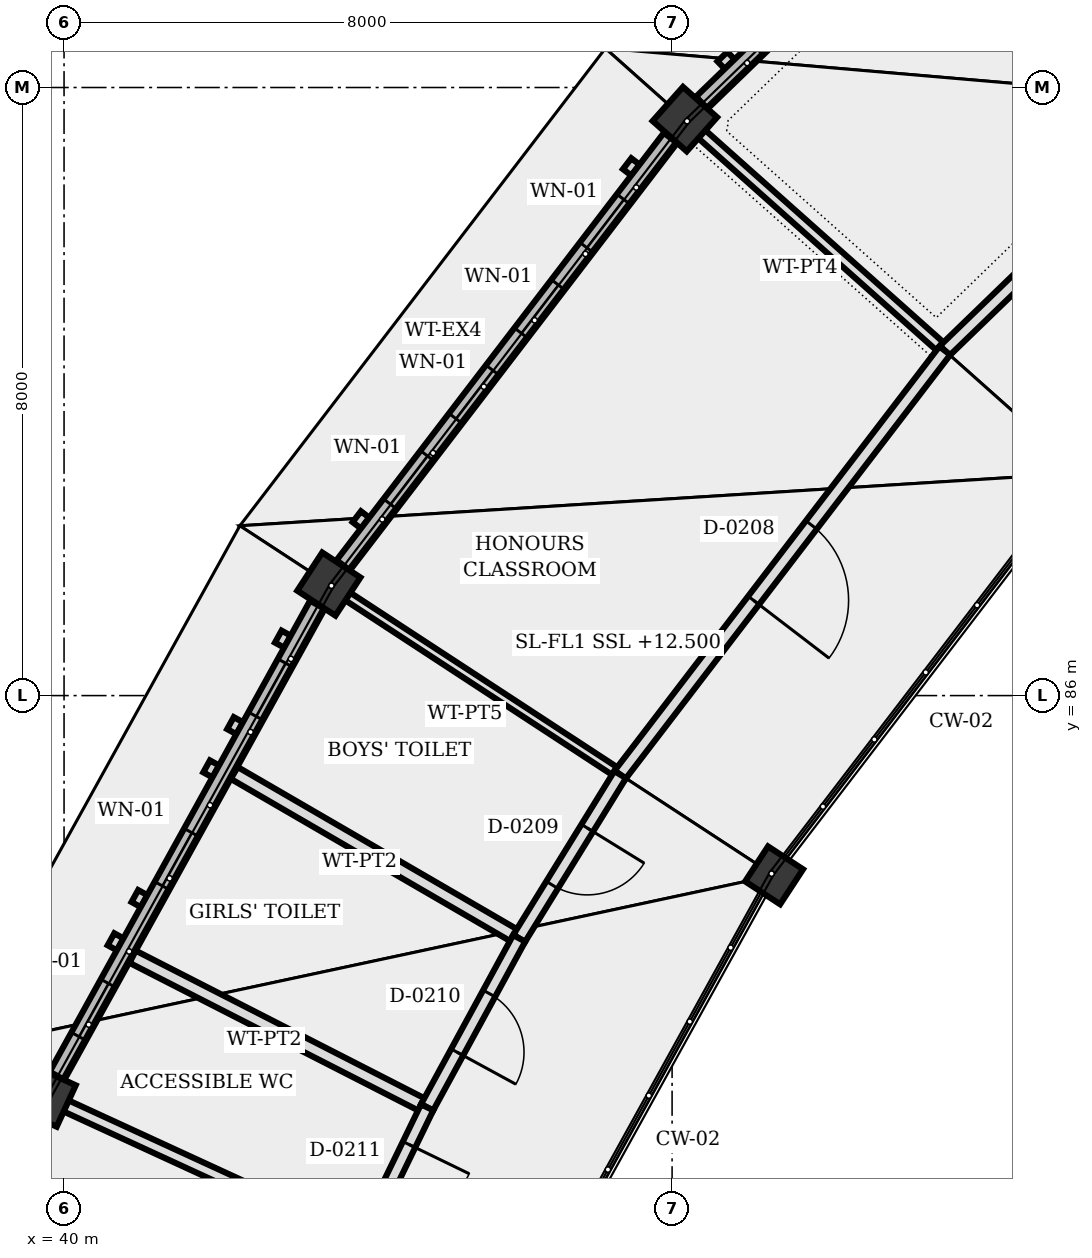
"""IFC4 building model, lengths in metres.
Left out: names, types, materials, properties, quantities, classifications, styles, units other than length and angle.
Written with IfcOpenShell. Run it as: python <this file> out.ifc"""

import sys

from ifc_helpers import new_model, si_unit, direction, frame, frame_2d, origin, origin_2d, place, context, subcontext, project, spatial, rectangle, extrude, element, fill, save


model = new_model("IFC4")
c1 = context("Model", 3, precision=1e-05, world=origin(), true_north=direction((0.0, 1.0)))
c2 = subcontext(c1, "Body", "Model", "MODEL_VIEW")
j1 = project(units=[si_unit("LENGTHUNIT", "METRE"), si_unit("PLANEANGLEUNIT", "RADIAN")], contexts=[c1])
p1 = place(None, origin())
s1 = spatial("IfcSite", under=j1, at=p1, CompositionType="ELEMENT")
p2 = place(p1, origin())
s2 = spatial("IfcBuilding", under=s1, at=p2, CompositionType="ELEMENT")
p3 = place(p2, frame((0.0, 0.0, 12.5)))
s3 = spatial("IfcBuildingStorey", under=s2, at=p3, CompositionType="ELEMENT", Elevation=12.5)
p4 = place(p3, frame((49.342, 83.635, 0.0), z_axis=(0.0, 0.0, 1.0), x_axis=(-0.836840759551, 0.547446383817, 0.0)))
e1 = element("IfcColumn", 1, at=p4, inside=s3, PredefinedType="COLUMN", context=c2, shape_type="SweptSolid", body=[
    extrude(rectangle(XDim=0.55, YDim=0.55, at=origin_2d()), origin(), (0.0, 0.0, 1.0), 2.64),
])
for number, where, z_axis, x_axis in (
    (2, (48.168, 93.584, 0.0), (0.0, 0.0, 1.0), (-0.747, 0.665, 0.0)),
    (3, (43.484, 87.467, 0.0), (0.0, 0.0, 1.0), (-0.837, 0.547, 0.0)),
    (4, (39.756, 80.726, 0.0), (0.0, 0.0, 1.0), (-0.909, 0.418, 0.0)),
):
    element("IfcColumn", number, at=place(p3, frame(where, z_axis=z_axis, x_axis=x_axis)), inside=s3, PredefinedType="COLUMN", context=c2, shape_type="SweptSolid", body=[
        extrude(rectangle(XDim=0.6, YDim=0.6, at=origin_2d()), origin(), (0.0, 0.0, 1.0), 4.16),
    ])
p5 = place(p3, frame((48.391, 93.8, 0.0), z_axis=(0.0, 0.0, 1.0), x_axis=(0.71857824473, 0.695446120272, 0.0)))
e5 = element("IfcWall", 5, at=p5, inside=s3, PredefinedType="SOLIDWALL", context=c2, shape_type="SweptSolid", body=[
    extrude(rectangle(XDim=7.082, YDim=0.22, at=frame_2d((3.541, 0.0))), origin(), (0.0, 0.0, 1.0), 3.537),
])
p6 = place(p5, frame((1.016, 0.0, 0.85)))
e6 = element("IfcOpeningElement", 6, at=p6, cuts=e5, PredefinedType="OPENING", context=c2, shape_type="SweptSolid", body=[
    extrude(rectangle(XDim=0.8, YDim=1.1, at=frame_2d((0.4, 0.55))), frame((0.0, 0.12, 0.0), z_axis=(0.0, -1.0, 0.0), x_axis=(1.0, 0.0, 0.0)), (0.0, 0.0, 1.0), 0.24),
])
p7 = place(p5, frame((2.433, 0.0, 0.85)))
e7 = element("IfcOpeningElement", 7, at=p7, cuts=e5, PredefinedType="OPENING", context=c2, shape_type="SweptSolid", body=[
    extrude(rectangle(XDim=0.8, YDim=1.1, at=frame_2d((0.4, 0.55))), frame((0.0, 0.12, 0.0), z_axis=(0.0, -1.0, 0.0), x_axis=(1.0, 0.0, 0.0)), (0.0, 0.0, 1.0), 0.24),
])
p8 = place(p5, frame((3.849, 0.0, 0.85)))
e8 = element("IfcOpeningElement", 8, at=p8, cuts=e5, PredefinedType="OPENING", context=c2, shape_type="SweptSolid", body=[
    extrude(rectangle(XDim=0.8, YDim=1.1, at=frame_2d((0.4, 0.55))), frame((0.0, 0.12, 0.0), z_axis=(0.0, -1.0, 0.0), x_axis=(1.0, 0.0, 0.0)), (0.0, 0.0, 1.0), 0.24),
])
p9 = place(p5, frame((5.266, 0.0, 0.85)))
e9 = element("IfcOpeningElement", 9, at=p9, cuts=e5, PredefinedType="OPENING", context=c2, shape_type="SweptSolid", body=[
    extrude(rectangle(XDim=0.8, YDim=1.1, at=frame_2d((0.4, 0.55))), frame((0.0, 0.12, 0.0), z_axis=(0.0, -1.0, 0.0), x_axis=(1.0, 0.0, 0.0)), (0.0, 0.0, 1.0), 0.24),
])
p10 = place(p3, frame((43.673, 87.714, 0.0), z_axis=(0.0, 0.0, 1.0), x_axis=(0.607995054755, 0.793940812273, 0.0)))
e10 = element("IfcWall", 10, at=p10, inside=s3, PredefinedType="SOLIDWALL", context=c2, shape_type="SweptSolid", body=[
    extrude(rectangle(XDim=7.082, YDim=0.22, at=frame_2d((3.541, 0.0))), origin(), (0.0, 0.0, 1.0), 3.537),
])
p11 = place(p10, frame((1.016, 0.0, 0.85)))
e11 = element("IfcOpeningElement", 11, at=p11, cuts=e10, PredefinedType="OPENING", context=c2, shape_type="SweptSolid", body=[
    extrude(rectangle(XDim=0.8, YDim=1.1, at=frame_2d((0.4, 0.55))), frame((0.0, 0.12, 0.0), z_axis=(0.0, -1.0, 0.0), x_axis=(1.0, 0.0, 0.0)), (0.0, 0.0, 1.0), 0.24),
])
p12 = place(p10, frame((2.433, 0.0, 0.85)))
e12 = element("IfcOpeningElement", 12, at=p12, cuts=e10, PredefinedType="OPENING", context=c2, shape_type="SweptSolid", body=[
    extrude(rectangle(XDim=0.8, YDim=1.1, at=frame_2d((0.4, 0.55))), frame((0.0, 0.12, 0.0), z_axis=(0.0, -1.0, 0.0), x_axis=(1.0, 0.0, 0.0)), (0.0, 0.0, 1.0), 0.24),
])
p13 = place(p10, frame((3.849, 0.0, 0.85)))
e13 = element("IfcOpeningElement", 13, at=p13, cuts=e10, PredefinedType="OPENING", context=c2, shape_type="SweptSolid", body=[
    extrude(rectangle(XDim=0.8, YDim=1.1, at=frame_2d((0.4, 0.55))), frame((0.0, 0.12, 0.0), z_axis=(0.0, -1.0, 0.0), x_axis=(1.0, 0.0, 0.0)), (0.0, 0.0, 1.0), 0.24),
])
p14 = place(p10, frame((5.266, 0.0, 0.85)))
e14 = element("IfcOpeningElement", 14, at=p14, cuts=e10, PredefinedType="OPENING", context=c2, shape_type="SweptSolid", body=[
    extrude(rectangle(XDim=0.8, YDim=1.1, at=frame_2d((0.4, 0.55))), frame((0.0, 0.12, 0.0), z_axis=(0.0, -1.0, 0.0), x_axis=(1.0, 0.0, 0.0)), (0.0, 0.0, 1.0), 0.24),
])
p15 = place(p3, frame((39.907, 80.998, 0.0), z_axis=(0.0, 0.0, 1.0), x_axis=(0.483832760768, 0.875160476489, 0.0)))
e15 = element("IfcWall", 15, at=p15, inside=s3, PredefinedType="SOLIDWALL", context=c2, shape_type="SweptSolid", body=[
    extrude(rectangle(XDim=7.081, YDim=0.22, at=frame_2d((3.541, 0.0))), origin(), (0.0, 0.0, 1.0), 3.537),
])
p16 = place(p15, frame((0.591, 0.0, 1.15)))
e16 = element("IfcOpeningElement", 16, at=p16, cuts=e15, PredefinedType="OPENING", context=c2, shape_type="SweptSolid", body=[
    extrude(rectangle(XDim=0.8, YDim=1.1, at=frame_2d((0.4, 0.55))), frame((0.0, 0.12, 0.0), z_axis=(0.0, -1.0, 0.0), x_axis=(1.0, 0.0, 0.0)), (0.0, 0.0, 1.0), 0.24),
])
p17 = place(p15, frame((2.857, 0.0, 1.15)))
e17 = element("IfcOpeningElement", 17, at=p17, cuts=e15, PredefinedType="OPENING", context=c2, shape_type="SweptSolid", body=[
    extrude(rectangle(XDim=0.8, YDim=1.1, at=frame_2d((0.4, 0.55))), frame((0.0, 0.12, 0.0), z_axis=(0.0, -1.0, 0.0), x_axis=(1.0, 0.0, 0.0)), (0.0, 0.0, 1.0), 0.24),
])
p18 = place(p15, frame((5.406, 0.0, 1.15)))
e18 = element("IfcOpeningElement", 18, at=p18, cuts=e15, PredefinedType="OPENING", context=c2, shape_type="SweptSolid", body=[
    extrude(rectangle(XDim=0.8, YDim=1.1, at=frame_2d((0.4, 0.55))), frame((0.0, 0.12, 0.0), z_axis=(0.0, -1.0, 0.0), x_axis=(1.0, 0.0, 0.0)), (0.0, 0.0, 1.0), 0.24),
])
p19 = place(p3, frame((51.588, 90.538, 0.0), z_axis=(0.0, 0.0, 1.0), x_axis=(-0.746752390412, 0.665102148105, 0.0)))
e19 = element("IfcWall", 19, at=p19, inside=s3, PredefinedType="PARTITIONING", context=c2, shape_type="SweptSolid", body=[
    extrude(rectangle(XDim=4.288, YDim=0.14, at=frame_2d((2.144, 0.0))), origin(), (0.0, 0.0, 1.0), 3.397),
])
p20 = place(p3, frame((47.317, 84.96, 0.0), z_axis=(0.0, 0.0, 1.0), x_axis=(-0.836931498536, 0.54730765275, 0.0)))
e20 = element("IfcWall", 20, at=p20, inside=s3, PredefinedType="PARTITIONING", context=c2, shape_type="SweptSolid", body=[
    extrude(rectangle(XDim=4.288, YDim=0.12, at=frame_2d((2.144, 0.0))), origin(), (0.0, 0.0, 1.0), 3.397),
])
p21 = place(p3, frame((43.917, 78.812, 0.0), z_axis=(0.0, 0.0, 1.0), x_axis=(-0.908505150055, 0.417873655934, 0.0)))
e21 = element("IfcWall", 21, at=p21, inside=s3, PredefinedType="PARTITIONING", context=c2, shape_type="SweptSolid", body=[
    extrude(rectangle(XDim=4.288, YDim=0.16, at=frame_2d((2.144, 0.0))), origin(), (0.0, 0.0, 1.0), 3.397),
])
p22 = place(p3, frame((45.988, 82.806, 0.0), z_axis=(0.0, 0.0, 1.0), x_axis=(-0.864871773355, 0.501992844225, 0.0)))
e22 = element("IfcWall", 22, at=p22, inside=s3, PredefinedType="PARTITIONING", context=c2, shape_type="SweptSolid", body=[
    extrude(rectangle(XDim=4.335, YDim=0.18, at=frame_2d((2.167, 0.0))), origin(), (0.0, 0.0, 1.0), 3.398),
])
p23 = place(p3, frame((44.777, 80.583, 0.0), z_axis=(0.0, 0.0, 1.0), x_axis=(-0.890397294755, 0.455184201717, 0.0)))
e23 = element("IfcWall", 23, at=p23, inside=s3, PredefinedType="PARTITIONING", context=c2, shape_type="SweptSolid", body=[
    extrude(rectangle(XDim=4.352, YDim=0.18, at=frame_2d((2.176, 0.0))), origin(), (0.0, 0.0, 1.0), 3.397),
])
p24 = place(p3, frame((56.636, 95.424, 0.0), z_axis=(0.0, 0.0, 1.0), x_axis=(-0.718550040998, -0.695475260942, 0.0)))
e24 = element("IfcWall", 24, at=p24, inside=s3, PredefinedType="PARTITIONING", context=c2, shape_type="SweptSolid", body=[
    extrude(rectangle(XDim=7.025, YDim=0.18, at=frame_2d((3.513, 0.0))), origin(), (0.0, 0.0, 1.0), 3.397),
])
p25 = place(p24, frame((3.023, 0.0, 0.0)))
e25 = element("IfcOpeningElement", 25, at=p25, cuts=e24, PredefinedType="OPENING", context=c2, shape_type="SweptSolid", body=[
    extrude(rectangle(XDim=0.98, YDim=2.2, at=frame_2d((0.49, 1.1))), frame((0.0, 0.1, 0.0), z_axis=(0.0, -1.0, 0.0), x_axis=(1.0, 0.0, 0.0)), (0.0, 0.0, 1.0), 0.2),
])
p26 = place(p3, frame((51.588, 90.538, 0.0), z_axis=(0.0, 0.0, 1.0), x_axis=(-0.607932411016, -0.793988780548, 0.0)))
e26 = element("IfcWall", 26, at=p26, inside=s3, PredefinedType="PARTITIONING", context=c2, shape_type="SweptSolid", body=[
    extrude(rectangle(XDim=7.025, YDim=0.18, at=frame_2d((3.513, 0.0))), origin(), (0.0, 0.0, 1.0), 3.397),
])
p27 = place(p26, frame((2.888, 0.0, 0.0)))
e27 = element("IfcOpeningElement", 27, at=p27, cuts=e26, PredefinedType="OPENING", context=c2, shape_type="SweptSolid", body=[
    extrude(rectangle(XDim=1.25, YDim=2.2, at=frame_2d((0.625, 1.1))), frame((0.0, 0.1, 0.0), z_axis=(0.0, -1.0, 0.0), x_axis=(1.0, 0.0, 0.0)), (0.0, 0.0, 1.0), 0.2),
])
p28 = place(p3, frame((47.317, 84.96, 0.0), z_axis=(0.0, 0.0, 1.0), x_axis=(-0.52503894851, -0.851078200019, 0.0)))
e28 = element("IfcWall", 28, at=p28, inside=s3, PredefinedType="PARTITIONING", context=c2, shape_type="SweptSolid", body=[
    extrude(rectangle(XDim=2.531, YDim=0.18, at=frame_2d((1.266, 0.0))), origin(), (0.0, 0.0, 1.0), 3.397),
])
p29 = place(p28, frame((0.825, 0.0, 0.0)))
e29 = element("IfcOpeningElement", 29, at=p29, cuts=e28, PredefinedType="OPENING", context=c2, shape_type="SweptSolid", body=[
    extrude(rectangle(XDim=0.88, YDim=2.1, at=frame_2d((0.44, 1.05))), frame((0.0, 0.1, 0.0), z_axis=(0.0, -1.0, 0.0), x_axis=(1.0, 0.0, 0.0)), (0.0, 0.0, 1.0), 0.2),
])
p30 = place(p3, frame((45.988, 82.806, 0.0), z_axis=(0.0, 0.0, 1.0), x_axis=(-0.478379038954, -0.878153457597, 0.0)))
e30 = element("IfcWall", 30, at=p30, inside=s3, PredefinedType="PARTITIONING", context=c2, shape_type="SweptSolid", body=[
    extrude(rectangle(XDim=2.531, YDim=0.18, at=frame_2d((1.266, 0.0))), origin(), (0.0, 0.0, 1.0), 3.397),
])
p31 = place(p30, frame((0.826, 0.0, 0.0)))
e31 = element("IfcOpeningElement", 31, at=p31, cuts=e30, PredefinedType="OPENING", context=c2, shape_type="SweptSolid", body=[
    extrude(rectangle(XDim=0.88, YDim=2.1, at=frame_2d((0.44, 1.05))), frame((0.0, 0.1, 0.0), z_axis=(0.0, -1.0, 0.0), x_axis=(1.0, 0.0, 0.0)), (0.0, 0.0, 1.0), 0.2),
])
p32 = place(p3, frame((44.777, 80.583, 0.0), z_axis=(0.0, 0.0, 1.0), x_axis=(-0.436866695587, -0.899526258809, 0.0)))
e32 = element("IfcWall", 32, at=p32, inside=s3, PredefinedType="PARTITIONING", context=c2, shape_type="SweptSolid", body=[
    extrude(rectangle(XDim=1.969, YDim=0.18, at=frame_2d((0.984, 0.0))), origin(), (0.0, 0.0, 1.0), 3.397),
])
p33 = place(p32, frame((0.544, 0.0, 0.0)))
e33 = element("IfcOpeningElement", 33, at=p33, cuts=e32, PredefinedType="OPENING", context=c2, shape_type="SweptSolid", body=[
    extrude(rectangle(XDim=0.88, YDim=2.1, at=frame_2d((0.44, 1.05))), frame((0.0, 0.1, 0.0), z_axis=(0.0, -1.0, 0.0), x_axis=(1.0, 0.0, 0.0)), (0.0, 0.0, 1.0), 0.2),
])
p34 = place(p11, origin())
e34 = element("IfcWindow", 34, at=p34, inside=s3, PartitioningType="SINGLE_PANEL", PredefinedType="WINDOW", context=c2, shape_type="SweptSolid", body=[
    extrude(rectangle(XDim=0.8, YDim=1.1, at=frame_2d((0.4, 0.55))), frame((0.0, 0.03, 0.0), z_axis=(0.0, -1.0, 0.0), x_axis=(1.0, 0.0, 0.0)), (0.0, 0.0, 1.0), 0.06),
])
fill(e11, e34)
p35 = place(p12, origin())
e35 = element("IfcWindow", 35, at=p35, inside=s3, PartitioningType="SINGLE_PANEL", PredefinedType="WINDOW", context=c2, shape_type="SweptSolid", body=[
    extrude(rectangle(XDim=0.8, YDim=1.1, at=frame_2d((0.4, 0.55))), frame((0.0, 0.03, 0.0), z_axis=(0.0, -1.0, 0.0), x_axis=(1.0, 0.0, 0.0)), (0.0, 0.0, 1.0), 0.06),
])
fill(e12, e35)
p36 = place(p13, origin())
e36 = element("IfcWindow", 36, at=p36, inside=s3, PartitioningType="SINGLE_PANEL", PredefinedType="WINDOW", context=c2, shape_type="SweptSolid", body=[
    extrude(rectangle(XDim=0.8, YDim=1.1, at=frame_2d((0.4, 0.55))), frame((0.0, 0.03, 0.0), z_axis=(0.0, -1.0, 0.0), x_axis=(1.0, 0.0, 0.0)), (0.0, 0.0, 1.0), 0.06),
])
fill(e13, e36)
p37 = place(p14, origin())
e37 = element("IfcWindow", 37, at=p37, inside=s3, PartitioningType="SINGLE_PANEL", PredefinedType="WINDOW", context=c2, shape_type="SweptSolid", body=[
    extrude(rectangle(XDim=0.8, YDim=1.1, at=frame_2d((0.4, 0.55))), frame((0.0, 0.03, 0.0), z_axis=(0.0, -1.0, 0.0), x_axis=(1.0, 0.0, 0.0)), (0.0, 0.0, 1.0), 0.06),
])
fill(e14, e37)
p38 = place(p16, origin())
e38 = element("IfcWindow", 38, at=p38, inside=s3, PartitioningType="SINGLE_PANEL", PredefinedType="WINDOW", context=c2, shape_type="SweptSolid", body=[
    extrude(rectangle(XDim=0.8, YDim=1.1, at=frame_2d((0.4, 0.55))), frame((0.0, 0.03, 0.0), z_axis=(0.0, -1.0, 0.0), x_axis=(1.0, 0.0, 0.0)), (0.0, 0.0, 1.0), 0.06),
])
fill(e16, e38)
p39 = place(p17, origin())
e39 = element("IfcWindow", 39, at=p39, inside=s3, PartitioningType="SINGLE_PANEL", PredefinedType="WINDOW", context=c2, shape_type="SweptSolid", body=[
    extrude(rectangle(XDim=0.8, YDim=1.1, at=frame_2d((0.4, 0.55))), frame((0.0, 0.03, 0.0), z_axis=(0.0, -1.0, 0.0), x_axis=(1.0, 0.0, 0.0)), (0.0, 0.0, 1.0), 0.06),
])
fill(e17, e39)
p40 = place(p18, origin())
e40 = element("IfcWindow", 40, at=p40, inside=s3, PartitioningType="SINGLE_PANEL", PredefinedType="WINDOW", context=c2, shape_type="SweptSolid", body=[
    extrude(rectangle(XDim=0.8, YDim=1.1, at=frame_2d((0.4, 0.55))), frame((0.0, 0.03, 0.0), z_axis=(0.0, -1.0, 0.0), x_axis=(1.0, 0.0, 0.0)), (0.0, 0.0, 1.0), 0.06),
])
fill(e18, e40)
p41 = place(p27, origin())
e41 = element("IfcDoor", 41, at=p41, inside=s3, OperationType="SINGLE_SWING_RIGHT", PredefinedType="DOOR", context=c2, shape_type="SweptSolid", body=[
    extrude(rectangle(XDim=1.25, YDim=2.2, at=frame_2d((0.625, 1.1))), frame((0.0, 0.025, 0.0), z_axis=(0.0, -1.0, 0.0), x_axis=(1.0, 0.0, 0.0)), (0.0, 0.0, 1.0), 0.05),
])
fill(e27, e41)
p42 = place(p29, origin())
e42 = element("IfcDoor", 42, at=p42, inside=s3, OperationType="SINGLE_SWING_LEFT", PredefinedType="DOOR", context=c2, shape_type="SweptSolid", body=[
    extrude(rectangle(XDim=0.88, YDim=2.1, at=frame_2d((0.44, 1.05))), frame((0.0, 0.025, 0.0), z_axis=(0.0, -1.0, 0.0), x_axis=(1.0, 0.0, 0.0)), (0.0, 0.0, 1.0), 0.05),
])
fill(e29, e42)
p43 = place(p31, origin())
e43 = element("IfcDoor", 43, at=p43, inside=s3, OperationType="SINGLE_SWING_RIGHT", PredefinedType="DOOR", context=c2, shape_type="SweptSolid", body=[
    extrude(rectangle(XDim=0.88, YDim=2.1, at=frame_2d((0.44, 1.05))), frame((0.0, 0.025, 0.0), z_axis=(0.0, -1.0, 0.0), x_axis=(1.0, 0.0, 0.0)), (0.0, 0.0, 1.0), 0.05),
])
fill(e31, e43)
p44 = place(p33, origin())
e44 = element("IfcDoor", 44, at=p44, inside=s3, OperationType="SINGLE_SWING_LEFT", PredefinedType="DOOR", context=c2, shape_type="SweptSolid", body=[
    extrude(rectangle(XDim=0.88, YDim=2.1, at=frame_2d((0.44, 1.05))), frame((0.0, 0.025, 0.0), z_axis=(0.0, -1.0, 0.0), x_axis=(1.0, 0.0, 0.0)), (0.0, 0.0, 1.0), 0.05),
])
fill(e33, e44)
save(model, sys.argv[1])
